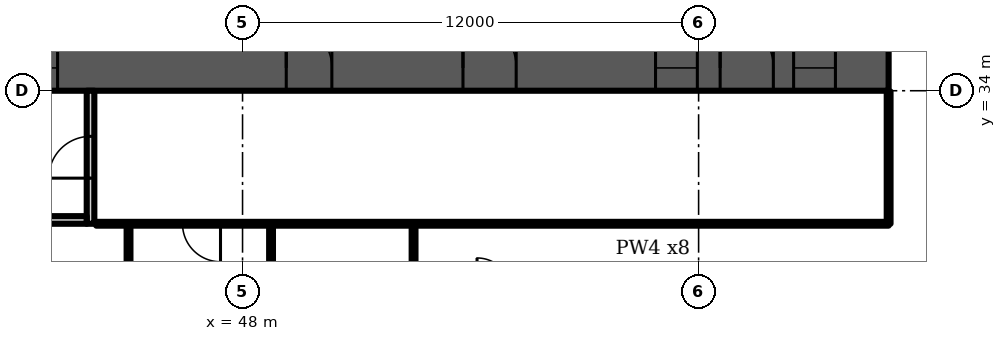
"""IFC4 building model, lengths in metres.
Left out: names, types, materials, properties, quantities, classifications, styles, units other than length and angle.
Written with IfcOpenShell. Run it as: python <this file> out.ifc"""

import sys

from ifc_helpers import new_model, si_unit, direction, frame, frame_2d, origin, place, context, subcontext, project, spatial, rectangle, extrude, element, fill, save


model = new_model("IFC4")
c1 = context("Model", 3, precision=1e-05, world=origin(), true_north=direction((0.0, 1.0)))
c2 = subcontext(c1, "Body", "Model", "MODEL_VIEW")
j1 = project(units=[si_unit("LENGTHUNIT", "METRE"), si_unit("PLANEANGLEUNIT", "RADIAN")], contexts=[c1])
p1 = place(None, origin())
s1 = spatial("IfcSite", under=j1, at=p1, CompositionType="ELEMENT")
p2 = place(p1, origin())
s2 = spatial("IfcBuilding", under=s1, at=p2, CompositionType="ELEMENT")
p3 = place(p2, frame((0.0, 0.0, 59.5)))
s3 = spatial("IfcBuildingStorey", under=s2, at=p3, CompositionType="ELEMENT", Elevation=59.5)
p4 = place(p3, frame((9.0, 34.6, 0.0), z_axis=(0.0, 0.0, 1.0), x_axis=(1.0, 0.0, 0.0)))
e1 = element("IfcWall", 1, at=p4, inside=s3, PredefinedType="SHEAR", context=c2, shape_type="SweptSolid", body=[
    extrude(rectangle(XDim=56.0, YDim=1.2, at=frame_2d((28.0, 0.0))), origin(), (0.0, 0.0, 1.0), 3.6),
])
p5 = place(p4, frame((2.0, 0.0, 0.0)))
e2 = element("IfcOpeningElement", 2, at=p5, cuts=e1, PredefinedType="OPENING", context=c2, shape_type="SweptSolid", body=[
    extrude(rectangle(XDim=1.0, YDim=2.1, at=frame_2d((0.5, 1.05))), frame((0.0, 0.61, 0.0), z_axis=(0.0, -1.0, 0.0), x_axis=(1.0, 0.0, 0.0)), (0.0, 0.0, 1.0), 1.22),
])
p6 = place(p4, frame((4.6, 0.0, 0.0)))
e3 = element("IfcOpeningElement", 3, at=p6, cuts=e1, PredefinedType="OPENING", context=c2, shape_type="SweptSolid", body=[
    extrude(rectangle(XDim=1.0, YDim=2.1, at=frame_2d((0.5, 1.05))), frame((0.0, 0.61, 0.0), z_axis=(0.0, -1.0, 0.0), x_axis=(1.0, 0.0, 0.0)), (0.0, 0.0, 1.0), 1.22),
])
p7 = place(p4, frame((7.867, 0.0, 0.0)))
e4 = element("IfcOpeningElement", 4, at=p7, cuts=e1, PredefinedType="OPENING", context=c2, shape_type="SweptSolid", body=[
    extrude(rectangle(XDim=1.1, YDim=2.1, at=frame_2d((0.55, 1.05))), frame((0.0, 0.61, 0.0), z_axis=(0.0, -1.0, 0.0), x_axis=(1.0, 0.0, 0.0)), (0.0, 0.0, 1.0), 1.22),
])
p8 = place(p4, frame((12.033, 0.0, 0.0)))
e5 = element("IfcOpeningElement", 5, at=p8, cuts=e1, PredefinedType="OPENING", context=c2, shape_type="SweptSolid", body=[
    extrude(rectangle(XDim=1.1, YDim=2.1, at=frame_2d((0.55, 1.05))), frame((0.0, 0.61, 0.0), z_axis=(0.0, -1.0, 0.0), x_axis=(1.0, 0.0, 0.0)), (0.0, 0.0, 1.0), 1.22),
])
p9 = place(p4, frame((9.8, 0.0, 0.0)))
e6 = element("IfcOpeningElement", 6, at=p9, cuts=e1, PredefinedType="OPENING", context=c2, shape_type="SweptSolid", body=[
    extrude(rectangle(XDim=1.4, YDim=2.1, at=frame_2d((0.7, 1.05))), frame((0.0, 0.61, 0.0), z_axis=(0.0, -1.0, 0.0), x_axis=(1.0, 0.0, 0.0)), (0.0, 0.0, 1.0), 1.22),
])
p10 = place(p4, frame((14.65, 0.0, 0.0)))
e7 = element("IfcOpeningElement", 7, at=p10, cuts=e1, PredefinedType="OPENING", context=c2, shape_type="SweptSolid", body=[
    extrude(rectangle(XDim=1.2, YDim=2.1, at=frame_2d((0.6, 1.05))), frame((0.0, 0.61, 0.0), z_axis=(0.0, -1.0, 0.0), x_axis=(1.0, 0.0, 0.0)), (0.0, 0.0, 1.0), 1.22),
])
p11 = place(p4, frame((21.867, 0.0, 0.0)))
e8 = element("IfcOpeningElement", 8, at=p11, cuts=e1, PredefinedType="OPENING", context=c2, shape_type="SweptSolid", body=[
    extrude(rectangle(XDim=1.1, YDim=2.1, at=frame_2d((0.55, 1.05))), frame((0.0, 0.61, 0.0), z_axis=(0.0, -1.0, 0.0), x_axis=(1.0, 0.0, 0.0)), (0.0, 0.0, 1.0), 1.22),
])
p12 = place(p4, frame((26.033, 0.0, 0.0)))
e9 = element("IfcOpeningElement", 9, at=p12, cuts=e1, PredefinedType="OPENING", context=c2, shape_type="SweptSolid", body=[
    extrude(rectangle(XDim=1.1, YDim=2.1, at=frame_2d((0.55, 1.05))), frame((0.0, 0.61, 0.0), z_axis=(0.0, -1.0, 0.0), x_axis=(1.0, 0.0, 0.0)), (0.0, 0.0, 1.0), 1.22),
])
p13 = place(p4, frame((23.8, 0.0, 0.0)))
e10 = element("IfcOpeningElement", 10, at=p13, cuts=e1, PredefinedType="OPENING", context=c2, shape_type="SweptSolid", body=[
    extrude(rectangle(XDim=1.4, YDim=2.1, at=frame_2d((0.7, 1.05))), frame((0.0, 0.61, 0.0), z_axis=(0.0, -1.0, 0.0), x_axis=(1.0, 0.0, 0.0)), (0.0, 0.0, 1.0), 1.22),
])
p14 = place(p4, frame((28.867, 0.0, 0.0)))
e11 = element("IfcOpeningElement", 11, at=p14, cuts=e1, PredefinedType="OPENING", context=c2, shape_type="SweptSolid", body=[
    extrude(rectangle(XDim=1.1, YDim=2.1, at=frame_2d((0.55, 1.05))), frame((0.0, 0.61, 0.0), z_axis=(0.0, -1.0, 0.0), x_axis=(1.0, 0.0, 0.0)), (0.0, 0.0, 1.0), 1.22),
])
p15 = place(p4, frame((33.033, 0.0, 0.0)))
e12 = element("IfcOpeningElement", 12, at=p15, cuts=e1, PredefinedType="OPENING", context=c2, shape_type="SweptSolid", body=[
    extrude(rectangle(XDim=1.1, YDim=2.1, at=frame_2d((0.55, 1.05))), frame((0.0, 0.61, 0.0), z_axis=(0.0, -1.0, 0.0), x_axis=(1.0, 0.0, 0.0)), (0.0, 0.0, 1.0), 1.22),
])
p16 = place(p4, frame((40.15, 0.0, 0.0)))
e13 = element("IfcOpeningElement", 13, at=p16, cuts=e1, PredefinedType="OPENING", context=c2, shape_type="SweptSolid", body=[
    extrude(rectangle(XDim=1.2, YDim=2.1, at=frame_2d((0.6, 1.05))), frame((0.0, 0.61, 0.0), z_axis=(0.0, -1.0, 0.0), x_axis=(1.0, 0.0, 0.0)), (0.0, 0.0, 1.0), 1.22),
])
p17 = place(p4, frame((44.8, 0.0, 0.0)))
e14 = element("IfcOpeningElement", 14, at=p17, cuts=e1, PredefinedType="OPENING", context=c2, shape_type="SweptSolid", body=[
    extrude(rectangle(XDim=1.4, YDim=2.1, at=frame_2d((0.7, 1.05))), frame((0.0, 0.61, 0.0), z_axis=(0.0, -1.0, 0.0), x_axis=(1.0, 0.0, 0.0)), (0.0, 0.0, 1.0), 1.22),
])
p18 = place(p4, frame((49.867, 0.0, 0.0)))
e15 = element("IfcOpeningElement", 15, at=p18, cuts=e1, PredefinedType="OPENING", context=c2, shape_type="SweptSolid", body=[
    extrude(rectangle(XDim=1.1, YDim=2.1, at=frame_2d((0.55, 1.05))), frame((0.0, 0.61, 0.0), z_axis=(0.0, -1.0, 0.0), x_axis=(1.0, 0.0, 0.0)), (0.0, 0.0, 1.0), 1.22),
])
p19 = place(p4, frame((53.5, 0.0, 0.0)))
e16 = element("IfcOpeningElement", 16, at=p19, cuts=e1, PredefinedType="OPENING", context=c2, shape_type="SweptSolid", body=[
    extrude(rectangle(XDim=1.1, YDim=2.1, at=frame_2d((0.55, 1.05))), frame((0.0, 0.61, 0.0), z_axis=(0.0, -1.0, 0.0), x_axis=(1.0, 0.0, 0.0)), (0.0, 0.0, 1.0), 1.22),
])
p20 = place(p4, frame((51.567, 0.0, 0.0)))
e17 = element("IfcOpeningElement", 17, at=p20, cuts=e1, PredefinedType="OPENING", context=c2, shape_type="SweptSolid", body=[
    extrude(rectangle(XDim=1.4, YDim=2.1, at=frame_2d((0.7, 1.05))), frame((0.0, 0.61, 0.0), z_axis=(0.0, -1.0, 0.0), x_axis=(1.0, 0.0, 0.0)), (0.0, 0.0, 1.0), 1.22),
])
p21 = place(p3, frame((44.0, 30.5, 0.0), z_axis=(0.0, 0.0, 1.0), x_axis=(0.0, 1.0, 0.0)))
e18 = element("IfcWall", 18, at=p21, inside=s3, PredefinedType="PARTITIONING", context=c2, shape_type="SweptSolid", body=[
    extrude(rectangle(XDim=3.5, YDim=0.2, at=frame_2d((1.75, 0.0))), origin(), (0.0, 0.0, 1.0), 3.2),
])
p22 = place(p21, frame((1.2, 0.0, 0.0)))
e19 = element("IfcOpeningElement", 19, at=p22, cuts=e18, PredefinedType="OPENING", context=c2, shape_type="SweptSolid", body=[
    extrude(rectangle(XDim=1.1, YDim=2.1, at=frame_2d((0.55, 1.05))), frame((0.0, 0.11, 0.0), z_axis=(0.0, -1.0, 0.0), x_axis=(1.0, 0.0, 0.0)), (0.0, 0.0, 1.0), 0.22),
])
p23 = place(p3, frame((41.1, 30.6, 0.0), z_axis=(0.0, 0.0, 1.0), x_axis=(1.0, 0.0, 0.0)))
e20 = element("IfcWall", 20, at=p23, inside=s3, PredefinedType="PARTITIONING", context=c2, shape_type="SweptSolid", body=[
    extrude(rectangle(XDim=2.8, YDim=0.2, at=frame_2d((1.4, 0.0))), origin(), (0.0, 0.0, 1.0), 3.2),
])
for number, where, z_axis, x_axis in (
    (21, (45.0, 20.445, 0.0), (0.0, 0.0, 1.0), (0.0, 1.0, 0.0)),
    (22, (48.75, 20.445, 0.0), (0.0, 0.0, 1.0), (0.0, 1.0, 0.0)),
):
    element("IfcWall", number, at=place(p3, frame(where, z_axis=z_axis, x_axis=x_axis)), inside=s3, PredefinedType="PARTITIONING", context=c2, shape_type="SweptSolid", body=[
        extrude(rectangle(XDim=10.055, YDim=0.1, at=frame_2d((5.027, 0.0))), origin(), (0.0, 0.0, 1.0), 3.2),
    ])
p24 = place(p3, frame((52.5, 20.445, 0.0), z_axis=(0.0, 0.0, 1.0), x_axis=(0.0, 1.0, 0.0)))
e23 = element("IfcWall", 23, at=p24, inside=s3, PredefinedType="PARTITIONING", context=c2, shape_type="SweptSolid", body=[
    extrude(rectangle(XDim=10.045, YDim=0.1, at=frame_2d((5.022, 0.0))), origin(), (0.0, 0.0, 1.0), 3.2),
])
p25 = place(p3, frame((65.0, 30.5, 0.0), z_axis=(0.0, 0.0, 1.0), x_axis=(0.0, 1.0, 0.0)))
e24 = element("IfcWall", 24, at=p25, inside=s3, PredefinedType="PARTITIONING", context=c2, shape_type="SweptSolid", body=[
    extrude(rectangle(XDim=3.48, YDim=0.1, at=frame_2d((1.74, 0.0))), origin(), (0.0, 0.0, 1.0), 3.2),
])
p26 = place(p3, frame((44.15, 30.5, 0.0), z_axis=(0.0, 0.0, 1.0), x_axis=(1.0, 0.0, 0.0)))
e25 = element("IfcWall", 25, at=p26, inside=s3, PredefinedType="PARTITIONING", context=c2, shape_type="SweptSolid", body=[
    extrude(rectangle(XDim=20.85, YDim=0.1, at=frame_2d((10.425, 0.0))), origin(), (0.0, 0.0, 1.0), 3.2),
])
p27 = place(p26, frame((2.27, 0.0, 0.0)))
e26 = element("IfcOpeningElement", 26, at=p27, cuts=e25, PredefinedType="OPENING", context=c2, shape_type="SweptSolid", body=[
    extrude(rectangle(XDim=1.0, YDim=2.1, at=frame_2d((0.5, 1.05))), frame((0.0, 0.06, 0.0), z_axis=(0.0, -1.0, 0.0), x_axis=(1.0, 0.0, 0.0)), (0.0, 0.0, 1.0), 0.12),
])
p28 = place(p15, origin())
e27 = element("IfcDoor", 27, at=p28, inside=s3, OperationType="DOUBLE_DOOR_SLIDING", PredefinedType="DOOR", context=c2, shape_type="SweptSolid", body=[
    extrude(rectangle(XDim=1.1, YDim=2.1, at=frame_2d((0.55, 1.05))), frame((0.0, 0.025, 0.0), z_axis=(0.0, -1.0, 0.0), x_axis=(1.0, 0.0, 0.0)), (0.0, 0.0, 1.0), 0.05),
])
fill(e12, e27)
p29 = place(p16, origin())
e28 = element("IfcDoor", 28, at=p29, inside=s3, OperationType="SINGLE_SWING_LEFT", PredefinedType="DOOR", context=c2, shape_type="SweptSolid", body=[
    extrude(rectangle(XDim=1.2, YDim=2.1, at=frame_2d((0.6, 1.05))), frame((0.0, 0.025, 0.0), z_axis=(0.0, -1.0, 0.0), x_axis=(1.0, 0.0, 0.0)), (0.0, 0.0, 1.0), 0.05),
])
fill(e13, e28)
p30 = place(p17, origin())
e29 = element("IfcDoor", 29, at=p30, inside=s3, OperationType="DOUBLE_DOOR_SINGLE_SWING", PredefinedType="DOOR", context=c2, shape_type="SweptSolid", body=[
    extrude(rectangle(XDim=1.4, YDim=2.1, at=frame_2d((0.7, 1.05))), frame((0.0, 0.025, 0.0), z_axis=(0.0, -1.0, 0.0), x_axis=(1.0, 0.0, 0.0)), (0.0, 0.0, 1.0), 0.05),
])
fill(e14, e29)
p31 = place(p18, origin())
e30 = element("IfcDoor", 30, at=p31, inside=s3, OperationType="DOUBLE_DOOR_SLIDING", PredefinedType="DOOR", context=c2, shape_type="SweptSolid", body=[
    extrude(rectangle(XDim=1.1, YDim=2.1, at=frame_2d((0.55, 1.05))), frame((0.0, 0.025, 0.0), z_axis=(0.0, -1.0, 0.0), x_axis=(1.0, 0.0, 0.0)), (0.0, 0.0, 1.0), 0.05),
])
fill(e15, e30)
p32 = place(p19, origin())
e31 = element("IfcDoor", 31, at=p32, inside=s3, OperationType="DOUBLE_DOOR_SLIDING", PredefinedType="DOOR", context=c2, shape_type="SweptSolid", body=[
    extrude(rectangle(XDim=1.1, YDim=2.1, at=frame_2d((0.55, 1.05))), frame((0.0, 0.025, 0.0), z_axis=(0.0, -1.0, 0.0), x_axis=(1.0, 0.0, 0.0)), (0.0, 0.0, 1.0), 0.05),
])
fill(e16, e31)
p33 = place(p20, origin())
e32 = element("IfcDoor", 32, at=p33, inside=s3, OperationType="DOUBLE_DOOR_SINGLE_SWING", PredefinedType="DOOR", context=c2, shape_type="SweptSolid", body=[
    extrude(rectangle(XDim=1.4, YDim=2.1, at=frame_2d((0.7, 1.05))), frame((0.0, 0.025, 0.0), z_axis=(0.0, -1.0, 0.0), x_axis=(1.0, 0.0, 0.0)), (0.0, 0.0, 1.0), 0.05),
])
fill(e17, e32)
p34 = place(p22, origin())
e33 = element("IfcDoor", 33, at=p34, inside=s3, OperationType="SINGLE_SWING_LEFT", PredefinedType="DOOR", context=c2, shape_type="SweptSolid", body=[
    extrude(rectangle(XDim=1.1, YDim=2.1, at=frame_2d((0.55, 1.05))), frame((0.0, 0.025, 0.0), z_axis=(0.0, -1.0, 0.0), x_axis=(1.0, 0.0, 0.0)), (0.0, 0.0, 1.0), 0.05),
])
fill(e19, e33)
p35 = place(p27, origin())
e34 = element("IfcDoor", 34, at=p35, inside=s3, OperationType="SINGLE_SWING_RIGHT", PredefinedType="DOOR", context=c2, shape_type="SweptSolid", body=[
    extrude(rectangle(XDim=1.0, YDim=2.1, at=frame_2d((0.5, 1.05))), frame((0.0, 0.025, 0.0), z_axis=(0.0, -1.0, 0.0), x_axis=(1.0, 0.0, 0.0)), (0.0, 0.0, 1.0), 0.05),
])
fill(e26, e34)
save(model, sys.argv[1])
